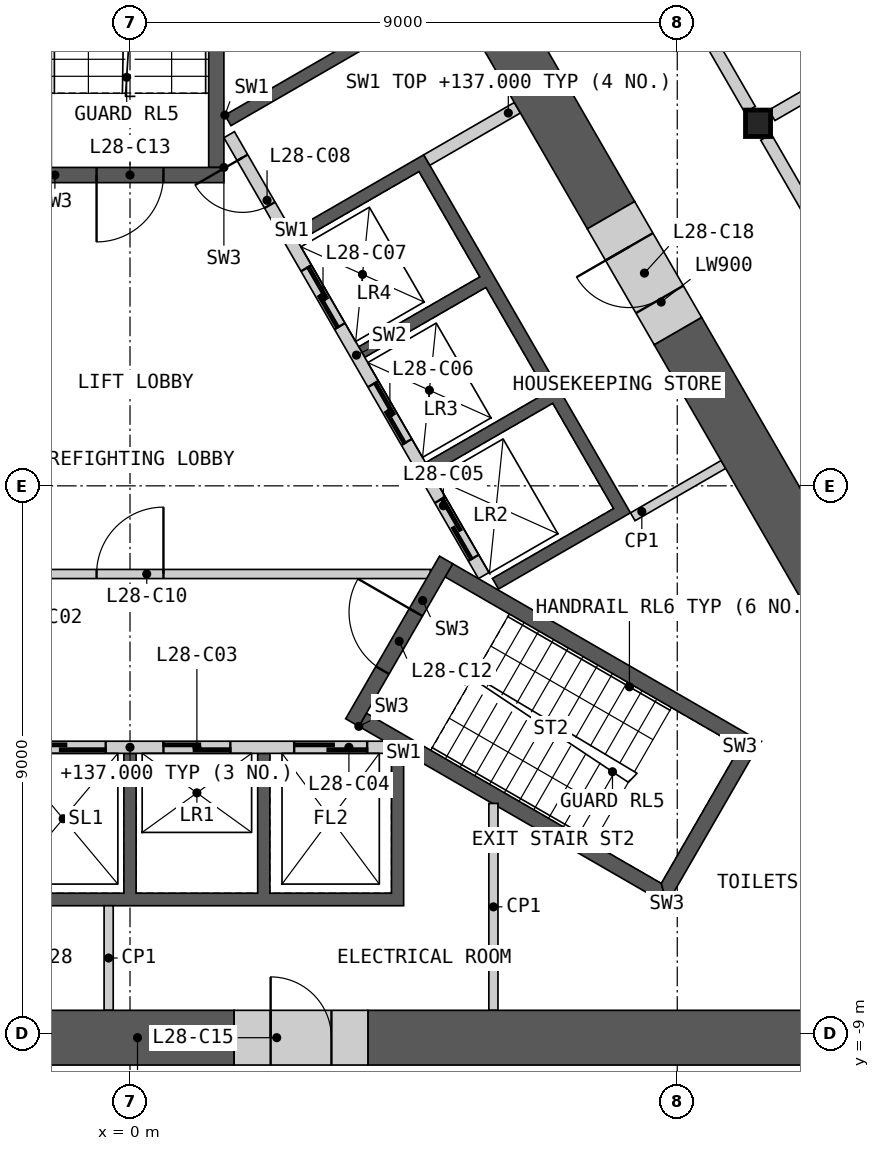
"""IFC4 building model, lengths in metres.
Left out: names, types, materials, properties, quantities, classifications, styles, units other than length and angle.
Written with IfcOpenShell. Run it as: python <this file> out.ifc"""

import sys

from ifc_helpers import new_model, si_unit, direction, frame, frame_2d, origin, origin_2d, place, context, subcontext, project, spatial, polyline, rectangle, i_section, outline, extrude, element, fill, save


model = new_model("IFC4")
c1 = context("Model", 3, precision=1e-05, world=origin(), true_north=direction((0.0, 1.0)))
c2 = subcontext(c1, "Body", "Model", "MODEL_VIEW")
j1 = project(units=[si_unit("LENGTHUNIT", "METRE"), si_unit("PLANEANGLEUNIT", "RADIAN")], contexts=[c1])
p1 = place(None, origin())
s1 = spatial("IfcSite", under=j1, at=p1, CompositionType="ELEMENT")
p2 = place(p1, origin())
s2 = spatial("IfcBuilding", under=s1, at=p2, CompositionType="ELEMENT")
p3 = place(p2, frame((0.0, 0.0, 133.2)))
s3 = spatial("IfcBuildingStorey", under=s2, at=p3, CompositionType="ELEMENT", Elevation=133.2)
p4 = place(p3, frame((10.328, 5.963, 0.0), z_axis=(0.0, 0.0, 1.0), x_axis=(1.0, 0.0, 0.0)))
e1 = element("IfcColumn", 1, at=p4, inside=s3, PredefinedType="COLUMN", context=c2, shape_type="SweptSolid", body=[
    extrude(i_section(OverallWidth=0.412, OverallDepth=0.435, WebThickness=0.036, FlangeThickness=0.057, at=origin_2d()), origin(), (0.0, 0.0, 1.0), 4.2),
])
p5 = place(p3, origin())
e2 = element("IfcWall", 2, at=p5, inside=s3, PredefinedType="SHEAR", context=c2, shape_type="SweptSolid", body=[
    extrude(outline(polyline([(4.5, -4.4), (4.5, -6.906), (-4.5, -6.906), (-4.5, -4.4), (-4.3, -4.4), (-4.3, -6.7), (-2.3, -6.7), (-2.3, -4.4), (-2.1, -4.4), (-2.1, -6.7), (-0.1, -6.7), (-0.1, -4.4), (0.1, -4.4), (0.1, -6.7), (2.1, -6.7), (2.1, -4.4), (2.3, -4.4), (2.3, -6.7), (4.3, -6.7), (4.3, -4.4), (4.5, -4.4)])), origin(), (0.0, 0.0, 1.0), 3.8),
])
p6 = place(p3, frame((-4.187, -4.3, 0.0), z_axis=(0.0, 0.0, 1.0), x_axis=(1.0, 0.0, 0.0)))
e3 = element("IfcWall", 3, at=p6, inside=s3, PredefinedType="SOLIDWALL", context=c2, shape_type="SweptSolid", body=[
    extrude(rectangle(XDim=8.373, YDim=0.2, at=frame_2d((4.187, 0.0))), origin(), (0.0, 0.0, 1.0), 3.8),
])
p7 = place(p6, frame((0.287, 0.0, 0.0)))
e4 = element("IfcOpeningElement", 4, at=p7, cuts=e3, PredefinedType="OPENING", context=c2, shape_type="SweptSolid", body=[
    extrude(rectangle(XDim=1.2, YDim=2.1, at=frame_2d((0.6, 1.05))), frame((0.0, 0.11, 0.0), z_axis=(0.0, -1.0, 0.0), x_axis=(1.0, 0.0, 0.0)), (0.0, 0.0, 1.0), 0.22),
])
p8 = place(p6, frame((2.387, 0.0, 0.0)))
e5 = element("IfcOpeningElement", 5, at=p8, cuts=e3, PredefinedType="OPENING", context=c2, shape_type="SweptSolid", body=[
    extrude(rectangle(XDim=1.4, YDim=2.1, at=frame_2d((0.7, 1.05))), frame((0.0, 0.11, 0.0), z_axis=(0.0, -1.0, 0.0), x_axis=(1.0, 0.0, 0.0)), (0.0, 0.0, 1.0), 0.22),
])
p9 = place(p6, frame((4.737, 0.0, 0.0)))
e6 = element("IfcOpeningElement", 6, at=p9, cuts=e3, PredefinedType="OPENING", context=c2, shape_type="SweptSolid", body=[
    extrude(rectangle(XDim=1.1, YDim=2.1, at=frame_2d((0.55, 1.05))), frame((0.0, 0.11, 0.0), z_axis=(0.0, -1.0, 0.0), x_axis=(1.0, 0.0, 0.0)), (0.0, 0.0, 1.0), 0.22),
])
p10 = place(p6, frame((6.887, 0.0, 0.0)))
e7 = element("IfcOpeningElement", 7, at=p10, cuts=e3, PredefinedType="OPENING", context=c2, shape_type="SweptSolid", body=[
    extrude(rectangle(XDim=1.2, YDim=2.1, at=frame_2d((0.6, 1.05))), frame((0.0, 0.11, 0.0), z_axis=(0.0, -1.0, 0.0), x_axis=(1.0, 0.0, 0.0)), (0.0, 0.0, 1.0), 0.22),
])
p11 = place(p3, origin())
e8 = element("IfcWall", 8, at=p11, inside=s3, PredefinedType="SHEAR", context=c2, shape_type="SweptSolid", body=[
    extrude(outline(polyline([(1.561, 6.097), (3.731, 7.35), (3.831, 7.177), (1.66, 5.924), (1.561, 6.097)])), origin(), (0.0, 0.0, 1.0), 3.8),
])
p12 = place(p3, origin())
e9 = element("IfcWall", 9, at=p12, inside=s3, PredefinedType="SHEAR", context=c2, shape_type="SweptSolid", body=[
    extrude(outline(polyline([(2.66, 4.192), (4.831, 5.445), (8.231, -0.444), (6.061, -1.697), (5.96, -1.524), (7.952, -0.374), (6.952, 1.358), (4.96, 0.208), (4.861, 0.381), (6.852, 1.531), (5.852, 3.263), (3.861, 2.113), (3.76, 2.287), (5.752, 3.437), (4.752, 5.169), (2.76, 4.019), (2.66, 4.192)])), origin(), (0.0, 0.0, 1.0), 3.8),
])
p13 = place(p3, frame((5.817, -1.476, 0.0), z_axis=(0.0, 0.0, 1.0), x_axis=(-0.500002616675, 0.866023893041, 0.0)))
e10 = element("IfcWall", 10, at=p13, inside=s3, PredefinedType="SOLIDWALL", context=c2, shape_type="SweptSolid", body=[
    extrude(rectangle(XDim=8.373, YDim=0.2, at=frame_2d((4.187, 0.0))), origin(), (0.0, 0.0, 1.0), 3.8),
])
p14 = place(p13, frame((0.337, 0.0, 0.0)))
e11 = element("IfcOpeningElement", 11, at=p14, cuts=e10, PredefinedType="OPENING", context=c2, shape_type="SweptSolid", body=[
    extrude(rectangle(XDim=1.1, YDim=2.1, at=frame_2d((0.55, 1.05))), frame((0.0, 0.11, 0.0), z_axis=(0.0, -1.0, 0.0), x_axis=(1.0, 0.0, 0.0)), (0.0, 0.0, 1.0), 0.22),
])
p15 = place(p13, frame((2.537, 0.0, 0.0)))
e12 = element("IfcOpeningElement", 12, at=p15, cuts=e10, PredefinedType="OPENING", context=c2, shape_type="SweptSolid", body=[
    extrude(rectangle(XDim=1.1, YDim=2.1, at=frame_2d((0.55, 1.05))), frame((0.0, 0.11, 0.0), z_axis=(0.0, -1.0, 0.0), x_axis=(1.0, 0.0, 0.0)), (0.0, 0.0, 1.0), 0.22),
])
p16 = place(p13, frame((4.737, 0.0, 0.0)))
e13 = element("IfcOpeningElement", 13, at=p16, cuts=e10, PredefinedType="OPENING", context=c2, shape_type="SweptSolid", body=[
    extrude(rectangle(XDim=1.1, YDim=2.1, at=frame_2d((0.55, 1.05))), frame((0.0, 0.11, 0.0), z_axis=(0.0, -1.0, 0.0), x_axis=(1.0, 0.0, 0.0)), (0.0, 0.0, 1.0), 0.22),
])
p17 = place(p13, frame((7.037, 0.0, 0.0)))
e14 = element("IfcOpeningElement", 14, at=p17, cuts=e10, PredefinedType="OPENING", context=c2, shape_type="SweptSolid", body=[
    extrude(rectangle(XDim=0.9, YDim=2.1, at=frame_2d((0.45, 1.05))), frame((0.0, 0.11, 0.0), z_axis=(0.0, -1.0, 0.0), x_axis=(1.0, 0.0, 0.0)), (0.0, 0.0, 1.0), 0.22),
])
p18 = place(p3, frame((4.881, 5.358, 0.0), z_axis=(0.0, 0.0, 1.0), x_axis=(0.866024871741, 0.500000921525, 0.0)))
e15 = element("IfcWall", 15, at=p18, inside=s3, PredefinedType="SHEAR", context=c2, shape_type="SweptSolid", body=[
    extrude(rectangle(XDim=1.72, YDim=0.2, at=frame_2d((0.86, 0.0))), origin(), (0.0, 0.0, 1.0), 3.8),
])
p19 = place(p3, frame((-4.941, -1.45, 0.0), z_axis=(0.0, 0.0, 1.0), x_axis=(1.0, 0.0, 0.0)))
e16 = element("IfcWall", 16, at=p19, inside=s3, PredefinedType="PARTITIONING", context=c2, shape_type="SweptSolid", body=[
    extrude(rectangle(XDim=9.882, YDim=0.15, at=frame_2d((4.941, 0.0))), origin(), (0.0, 0.0, 1.0), 3.8),
])
p20 = place(p19, frame((4.391, 0.0, 0.0)))
e17 = element("IfcOpeningElement", 17, at=p20, cuts=e16, PredefinedType="OPENING", context=c2, shape_type="SweptSolid", body=[
    extrude(rectangle(XDim=1.1, YDim=2.1, at=frame_2d((0.55, 1.05))), frame((0.0, 0.085, 0.0), z_axis=(0.0, -1.0, 0.0), x_axis=(1.0, 0.0, 0.0)), (0.0, 0.0, 1.0), 0.17),
])
p21 = place(p3, origin())
e18 = element("IfcWall", 18, at=p21, inside=s3, PredefinedType="SHEAR", context=c2, shape_type="SweptSolid", body=[
    extrude(outline(polyline([(3.763, -3.956), (8.83, -6.881), (8.738, -6.539), (3.888, -3.739), (3.763, -3.956)])), origin(), (0.0, 0.0, 1.0), 3.8),
])
p22 = place(p3, origin())
e19 = element("IfcWall", 19, at=p22, inside=s3, PredefinedType="SHEAR", context=c2, shape_type="SweptSolid", body=[
    extrude(outline(polyline([(8.83, -6.881), (10.374, -4.206), (10.032, -4.298), (8.738, -6.539), (8.83, -6.881)])), origin(), (0.0, 0.0, 1.0), 3.8),
])
p23 = place(p3, origin())
e20 = element("IfcWall", 20, at=p23, inside=s3, PredefinedType="SHEAR", context=c2, shape_type="SweptSolid", body=[
    extrude(outline(polyline([(10.032, -4.298), (10.374, -4.206), (5.307, -1.281), (5.182, -1.498), (10.032, -4.298)])), origin(), (0.0, 0.0, 1.0), 3.8),
])
p24 = place(p3, frame((3.655, -3.893, 0.0), z_axis=(0.0, 0.0, 1.0), x_axis=(0.499982516597, 0.866035497597, 0.0)))
e21 = element("IfcWall", 21, at=p24, inside=s3, PredefinedType="SHEAR", context=c2, shape_type="SweptSolid", body=[
    extrude(rectangle(XDim=3.088, YDim=0.25, at=frame_2d((1.544, 0.0))), origin(), (0.0, 0.0, 1.0), 3.8),
])
p25 = place(p24, frame((0.994, 0.0, 0.0)))
e22 = element("IfcOpeningElement", 22, at=p25, cuts=e21, PredefinedType="OPENING", context=c2, shape_type="SweptSolid", body=[
    extrude(rectangle(XDim=1.1, YDim=2.1, at=frame_2d((0.55, 1.05))), frame((0.0, 0.135, 0.0), z_axis=(0.0, -1.0, 0.0), x_axis=(1.0, 0.0, 0.0)), (0.0, 0.0, 1.0), 0.27),
])
p26 = place(p3, origin())
e23 = element("IfcWall", 23, at=p26, inside=s3, PredefinedType="SHEAR", context=c2, shape_type="SweptSolid", body=[
    extrude(outline(polyline([(1.544, 5.237), (1.544, 11.087), (1.294, 10.837), (1.294, 5.237), (1.544, 5.237)])), origin(), (0.0, 0.0, 1.0), 3.8),
])
p27 = place(p3, frame((1.544, 5.112, 0.0), z_axis=(0.0, 0.0, 1.0), x_axis=(-1.0, 0.0, 0.0)))
e24 = element("IfcWall", 24, at=p27, inside=s3, PredefinedType="SHEAR", context=c2, shape_type="SweptSolid", body=[
    extrude(rectangle(XDim=3.088, YDim=0.25, at=frame_2d((1.544, 0.0))), origin(), (0.0, 0.0, 1.0), 3.8),
])
p28 = place(p27, frame((0.994, 0.0, 0.0)))
e25 = element("IfcOpeningElement", 25, at=p28, cuts=e24, PredefinedType="OPENING", context=c2, shape_type="SweptSolid", body=[
    extrude(rectangle(XDim=1.1, YDim=2.1, at=frame_2d((0.55, 1.05))), frame((0.0, 0.135, 0.0), z_axis=(0.0, -1.0, 0.0), x_axis=(1.0, 0.0, 0.0)), (0.0, 0.0, 1.0), 0.27),
])
p29 = place(p3, frame((8.268, -0.509, 0.0), z_axis=(0.0, 0.0, 1.0), x_axis=(0.866024871741, 0.500000921525, 0.0)))
e26 = element("IfcWall", 26, at=p29, inside=s3, PredefinedType="PARTITIONING", context=c2, shape_type="SweptSolid", body=[
    extrude(rectangle(XDim=1.72, YDim=0.15, at=frame_2d((0.86, 0.0))), origin(), (0.0, 0.0, 1.0), 3.8),
])
p30 = place(p3, frame((5.977, -8.626, 0.0), z_axis=(0.0, 0.0, 1.0), x_axis=(0.0, 1.0, 0.0)))
e27 = element("IfcWall", 27, at=p30, inside=s3, PredefinedType="PARTITIONING", context=c2, shape_type="SweptSolid", body=[
    extrude(rectangle(XDim=3.403, YDim=0.15, at=frame_2d((1.701, 0.0))), origin(), (0.0, 0.0, 1.0), 3.8),
])
p31 = place(p3, frame((-0.351, -8.626, 0.0), z_axis=(0.0, 0.0, 1.0), x_axis=(0.0, 1.0, 0.0)))
e28 = element("IfcWall", 28, at=p31, inside=s3, PredefinedType="PARTITIONING", context=c2, shape_type="SweptSolid", body=[
    extrude(rectangle(XDim=1.72, YDim=0.15, at=frame_2d((0.86, 0.0))), origin(), (0.0, 0.0, 1.0), 3.8),
])
p32 = place(p3, frame((3.913, -9.076, 0.0), z_axis=(0.0, 0.0, 1.0), x_axis=(1.0, 0.0, 0.0)))
e29 = element("IfcWall", 29, at=p32, inside=s3, PredefinedType="SHEAR", context=c2, shape_type="SweptSolid", body=[
    extrude(rectangle(XDim=11.029, YDim=0.9, at=frame_2d((5.514, 0.0))), origin(), (0.0, 0.0, 1.0), 3.8),
])
p33 = place(p3, frame((-1.466, -9.076, 0.0), z_axis=(0.0, 0.0, 1.0), x_axis=(1.0, 0.0, 0.0)))
e30 = element("IfcWall", 30, at=p33, inside=s3, PredefinedType="SHEAR", context=c2, shape_type="SweptSolid", body=[
    extrude(rectangle(XDim=3.179, YDim=0.9, at=frame_2d((1.589, 0.0))), origin(), (0.0, 0.0, 1.0), 3.8),
])
p34 = place(p3, frame((7.91, 4.451, 0.0), z_axis=(0.0, 0.0, 1.0), x_axis=(-0.500001962043, 0.866024270995, 0.0)))
e31 = element("IfcWall", 31, at=p34, inside=s3, PredefinedType="SHEAR", context=c2, shape_type="SweptSolid", body=[
    extrude(rectangle(XDim=8.796, YDim=0.9, at=frame_2d((4.398, 0.0))), origin(), (0.0, 0.0, 1.0), 3.8),
])
p35 = place(p3, frame((12.208, -2.992, 0.0), z_axis=(0.0, 0.0, 1.0), x_axis=(-0.499990106751, 0.866031115579, 0.0)))
e32 = element("IfcWall", 32, at=p35, inside=s3, PredefinedType="SHEAR", context=c2, shape_type="SweptSolid", body=[
    extrude(rectangle(XDim=6.396, YDim=0.9, at=frame_2d((3.198, 0.0))), origin(), (0.0, 0.0, 1.0), 3.8),
])
p36 = place(p3, frame((1.713, -9.076, 0.0), z_axis=(0.0, 0.0, 1.0), x_axis=(1.0, 0.0, 0.0)))
e33 = element("IfcWall", 33, at=p36, inside=s3, PredefinedType="SHEAR", context=c2, shape_type="SweptSolid", body=[
    extrude(rectangle(XDim=2.2, YDim=0.9, at=frame_2d((1.1, 0.0))), origin(), (0.0, 0.0, 1.0), 3.8),
])
p37 = place(p36, frame((0.6, 0.0, 0.0)))
e34 = element("IfcOpeningElement", 34, at=p37, cuts=e33, PredefinedType="OPENING", context=c2, shape_type="SweptSolid", body=[
    extrude(rectangle(XDim=1.0, YDim=2.1, at=frame_2d((0.5, 1.05))), frame((0.0, 0.46, 0.0), z_axis=(0.0, -1.0, 0.0), x_axis=(1.0, 0.0, 0.0)), (0.0, 0.0, 1.0), 0.92),
])
p38 = place(p3, frame((9.01, 2.546, 0.0), z_axis=(0.0, 0.0, 1.0), x_axis=(-0.499994660107, 0.866028486751, 0.0)))
e35 = element("IfcWall", 35, at=p38, inside=s3, PredefinedType="SHEAR", context=c2, shape_type="SweptSolid", body=[
    extrude(rectangle(XDim=2.2, YDim=0.9, at=frame_2d((1.1, 0.0))), origin(), (0.0, 0.0, 1.0), 3.8),
])
p39 = place(p38, frame((0.6, 0.0, 0.0)))
e36 = element("IfcOpeningElement", 36, at=p39, cuts=e35, PredefinedType="OPENING", context=c2, shape_type="SweptSolid", body=[
    extrude(rectangle(XDim=1.0, YDim=2.1, at=frame_2d((0.5, 1.05))), frame((0.0, 0.46, 0.0), z_axis=(0.0, -1.0, 0.0), x_axis=(1.0, 0.0, 0.0)), (0.0, 0.0, 1.0), 0.92),
])
p40 = place(p3, frame((10.46, 5.736, 0.0), z_axis=(0.0, 0.0, 1.0), x_axis=(0.500004141693, -0.866023012564, 0.0)))
e37 = element("IfcWall", 37, at=p40, inside=s3, PredefinedType="PARTITIONING", context=c2, shape_type="SweptSolid", body=[
    extrude(rectangle(XDim=9.803, YDim=0.2, at=frame_2d((4.902, 0.0))), origin(), (0.0, 0.0, 1.0), 3.8),
])
p41 = place(p40, frame((4.352, 0.0, 0.0)))
e38 = element("IfcOpeningElement", 38, at=p41, cuts=e37, PredefinedType="OPENING", context=c2, shape_type="SweptSolid", body=[
    extrude(rectangle(XDim=1.0, YDim=2.1, at=frame_2d((0.5, 1.05))), frame((0.0, 0.11, 0.0), z_axis=(0.0, -1.0, 0.0), x_axis=(1.0, 0.0, 0.0)), (0.0, 0.0, 1.0), 0.22),
])
p42 = place(p3, frame((5.295, 14.68, 0.0), z_axis=(0.0, 0.0, 1.0), x_axis=(0.500012035596, -0.866018454918, 0.0)))
e39 = element("IfcWall", 39, at=p42, inside=s3, PredefinedType="PARTITIONING", context=c2, shape_type="SweptSolid", body=[
    extrude(rectangle(XDim=9.803, YDim=0.2, at=frame_2d((4.902, 0.0))), origin(), (0.0, 0.0, 1.0), 3.8),
])
p43 = place(p42, frame((4.052, 0.0, 0.0)))
e40 = element("IfcOpeningElement", 40, at=p43, cuts=e39, PredefinedType="OPENING", context=c2, shape_type="SweptSolid", body=[
    extrude(rectangle(XDim=1.8, YDim=2.1, at=frame_2d((0.9, 1.05))), frame((0.0, 0.11, 0.0), z_axis=(0.0, -1.0, 0.0), x_axis=(1.0, 0.0, 0.0)), (0.0, 0.0, 1.0), 0.22),
])
p44 = place(p3, frame((10.556, 6.094, 0.0), z_axis=(0.0, 0.0, 1.0), x_axis=(0.86602461759, 0.500001361726, 0.0)))
e41 = element("IfcWall", 41, at=p44, inside=s3, PredefinedType="PARTITIONING", context=c2, shape_type="SweptSolid", body=[
    extrude(rectangle(XDim=12.679, YDim=0.2, at=frame_2d((6.34, 0.0))), origin(), (0.0, 0.0, 1.0), 2.885),
])
p45 = place(p8, origin())
e42 = element("IfcDoor", 42, at=p45, inside=s3, OperationType="SLIDING_TO_LEFT", PredefinedType="DOOR", context=c2, shape_type="SweptSolid", body=[
    extrude(rectangle(XDim=1.4, YDim=2.1, at=frame_2d((0.7, 1.05))), frame((0.0, 0.025, 0.0), z_axis=(0.0, -1.0, 0.0), x_axis=(1.0, 0.0, 0.0)), (0.0, 0.0, 1.0), 0.05),
])
fill(e5, e42)
p46 = place(p9, origin())
e43 = element("IfcDoor", 43, at=p46, inside=s3, OperationType="SLIDING_TO_LEFT", PredefinedType="DOOR", context=c2, shape_type="SweptSolid", body=[
    extrude(rectangle(XDim=1.1, YDim=2.1, at=frame_2d((0.55, 1.05))), frame((0.0, 0.025, 0.0), z_axis=(0.0, -1.0, 0.0), x_axis=(1.0, 0.0, 0.0)), (0.0, 0.0, 1.0), 0.05),
])
fill(e6, e43)
p47 = place(p10, origin())
e44 = element("IfcDoor", 44, at=p47, inside=s3, OperationType="SLIDING_TO_LEFT", PredefinedType="DOOR", context=c2, shape_type="SweptSolid", body=[
    extrude(rectangle(XDim=1.2, YDim=2.1, at=frame_2d((0.6, 1.05))), frame((0.0, 0.025, 0.0), z_axis=(0.0, -1.0, 0.0), x_axis=(1.0, 0.0, 0.0)), (0.0, 0.0, 1.0), 0.05),
])
fill(e7, e44)
p48 = place(p14, origin())
e45 = element("IfcDoor", 45, at=p48, inside=s3, OperationType="SLIDING_TO_LEFT", PredefinedType="DOOR", context=c2, shape_type="SweptSolid", body=[
    extrude(rectangle(XDim=1.1, YDim=2.1, at=frame_2d((0.55, 1.05))), frame((0.0, 0.025, 0.0), z_axis=(0.0, -1.0, 0.0), x_axis=(1.0, 0.0, 0.0)), (0.0, 0.0, 1.0), 0.05),
])
fill(e11, e45)
p49 = place(p15, origin())
e46 = element("IfcDoor", 46, at=p49, inside=s3, OperationType="SLIDING_TO_LEFT", PredefinedType="DOOR", context=c2, shape_type="SweptSolid", body=[
    extrude(rectangle(XDim=1.1, YDim=2.1, at=frame_2d((0.55, 1.05))), frame((0.0, 0.025, 0.0), z_axis=(0.0, -1.0, 0.0), x_axis=(1.0, 0.0, 0.0)), (0.0, 0.0, 1.0), 0.05),
])
fill(e12, e46)
p50 = place(p16, origin())
e47 = element("IfcDoor", 47, at=p50, inside=s3, OperationType="SLIDING_TO_LEFT", PredefinedType="DOOR", context=c2, shape_type="SweptSolid", body=[
    extrude(rectangle(XDim=1.1, YDim=2.1, at=frame_2d((0.55, 1.05))), frame((0.0, 0.025, 0.0), z_axis=(0.0, -1.0, 0.0), x_axis=(1.0, 0.0, 0.0)), (0.0, 0.0, 1.0), 0.05),
])
fill(e13, e47)
p51 = place(p17, origin())
e48 = element("IfcDoor", 48, at=p51, inside=s3, OperationType="SINGLE_SWING_RIGHT", PredefinedType="DOOR", context=c2, shape_type="SweptSolid", body=[
    extrude(rectangle(XDim=0.9, YDim=2.1, at=frame_2d((0.45, 1.05))), frame((0.0, 0.025, 0.0), z_axis=(0.0, -1.0, 0.0), x_axis=(1.0, 0.0, 0.0)), (0.0, 0.0, 1.0), 0.05),
])
fill(e14, e48)
p52 = place(p20, origin())
e49 = element("IfcDoor", 49, at=p52, inside=s3, OperationType="SINGLE_SWING_RIGHT", PredefinedType="DOOR", context=c2, shape_type="SweptSolid", body=[
    extrude(rectangle(XDim=1.1, YDim=2.1, at=frame_2d((0.55, 1.05))), frame((0.0, 0.025, 0.0), z_axis=(0.0, -1.0, 0.0), x_axis=(1.0, 0.0, 0.0)), (0.0, 0.0, 1.0), 0.05),
])
fill(e17, e49)
p53 = place(p25, origin())
e50 = element("IfcDoor", 50, at=p53, inside=s3, OperationType="SINGLE_SWING_RIGHT", PredefinedType="DOOR", context=c2, shape_type="SweptSolid", body=[
    extrude(rectangle(XDim=1.1, YDim=2.1, at=frame_2d((0.55, 1.05))), frame((0.0, 0.025, 0.0), z_axis=(0.0, -1.0, 0.0), x_axis=(1.0, 0.0, 0.0)), (0.0, 0.0, 1.0), 0.05),
])
fill(e22, e50)
p54 = place(p28, origin())
e51 = element("IfcDoor", 51, at=p54, inside=s3, OperationType="SINGLE_SWING_RIGHT", PredefinedType="DOOR", context=c2, shape_type="SweptSolid", body=[
    extrude(rectangle(XDim=1.1, YDim=2.1, at=frame_2d((0.55, 1.05))), frame((0.0, 0.025, 0.0), z_axis=(0.0, -1.0, 0.0), x_axis=(1.0, 0.0, 0.0)), (0.0, 0.0, 1.0), 0.05),
])
fill(e25, e51)
p55 = place(p37, origin())
e52 = element("IfcDoor", 52, at=p55, inside=s3, OperationType="SINGLE_SWING_LEFT", PredefinedType="DOOR", context=c2, shape_type="SweptSolid", body=[
    extrude(rectangle(XDim=1.0, YDim=2.1, at=frame_2d((0.5, 1.05))), frame((0.0, 0.205, 0.0), z_axis=(0.0, -1.0, 0.0), x_axis=(1.0, 0.0, 0.0)), (0.0, 0.0, 1.0), 0.05),
])
fill(e34, e52)
p56 = place(p39, origin())
e53 = element("IfcDoor", 53, at=p56, inside=s3, OperationType="SINGLE_SWING_RIGHT", PredefinedType="DOOR", context=c2, shape_type="SweptSolid", body=[
    extrude(rectangle(XDim=1.0, YDim=2.1, at=frame_2d((0.5, 1.05))), frame((0.0, 0.205, 0.0), z_axis=(0.0, -1.0, 0.0), x_axis=(1.0, 0.0, 0.0)), (0.0, 0.0, 1.0), 0.05),
])
fill(e36, e53)
save(model, sys.argv[1])
